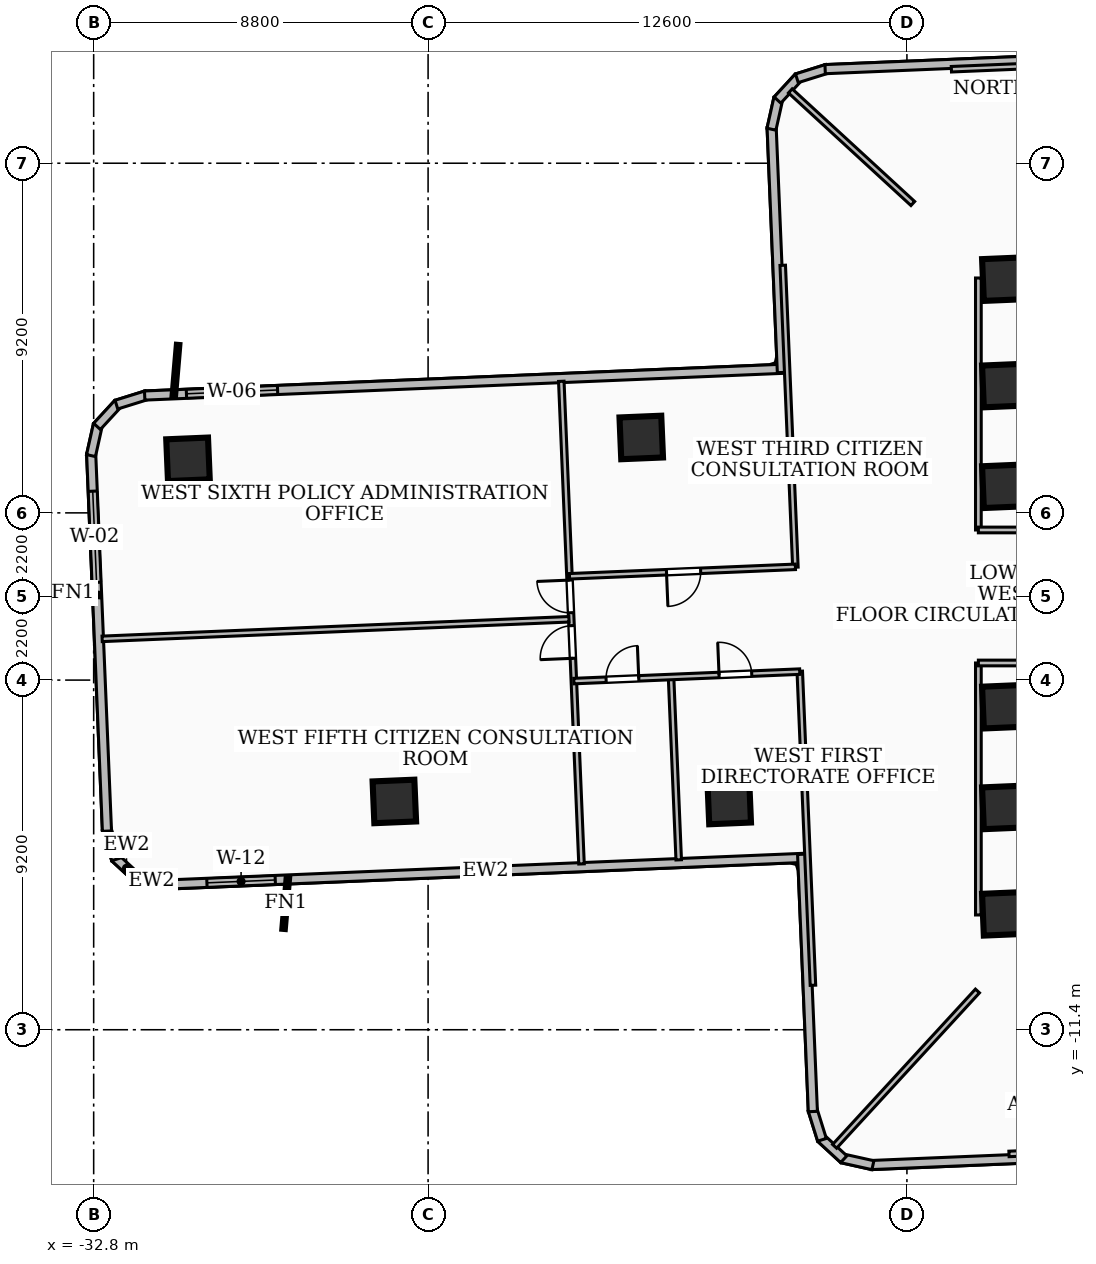
"""IFC4 building model, lengths in metres.
Left out: names, types, materials, properties, quantities, classifications, styles, units other than length and angle.
Written with IfcOpenShell. Run it as: python <this file> out.ifc"""

import sys

from ifc_helpers import new_model, si_unit, direction, frame, frame_2d, origin, origin_2d, place, context, subcontext, project, spatial, rectangle, extrude, element, fill, save


model = new_model("IFC4")
c1 = context("Model", 3, precision=1e-05, world=origin(), true_north=direction((0.0, 1.0)))
c2 = subcontext(c1, "Body", "Model", "MODEL_VIEW")
j1 = project(units=[si_unit("LENGTHUNIT", "METRE"), si_unit("PLANEANGLEUNIT", "RADIAN")], contexts=[c1])
p1 = place(None, origin())
s1 = spatial("IfcSite", under=j1, at=p1, CompositionType="ELEMENT")
p2 = place(p1, origin())
s2 = spatial("IfcBuilding", under=s1, at=p2, CompositionType="ELEMENT")
p3 = place(p2, frame((0.0, 0.0, 42.48)))
s3 = spatial("IfcBuildingStorey", under=s2, at=p3, CompositionType="ELEMENT", Elevation=42.48)
for number, where, z_axis, x_axis in (
    (1, (-8.78, 8.585, 0.0), (0.0, 0.0, 1.0), (1.0, 0.0, 0.0)),
    (2, (8.78, -8.585, 0.0), (0.0, 0.0, 1.0), (-1.0, 0.0, 0.0)),
):
    element("IfcWall", number, at=place(p3, frame(where, z_axis=z_axis, x_axis=x_axis)), inside=s3, PredefinedType="SHEAR", context=c2, shape_type="SweptSolid", body=[
        extrude(rectangle(XDim=17.56, YDim=0.55, at=frame_2d((8.78, 0.0))), origin(), (0.0, 0.0, 1.0), 3.34),
    ])
for number, where, z_axis, x_axis in (
    (3, (-8.85, -5.55, 0.0), (0.0, 0.0, 1.0), (0.999, 0.042, 0.0)),
    (4, (-8.85, -2.9, 0.0), (0.0, 0.0, 1.0), (0.999, 0.042, 0.0)),
    (5, (-8.85, 2.9, 0.0), (0.0, 0.0, 1.0), (0.999, 0.042, 0.0)),
    (6, (-8.85, 5.55, 0.0), (0.0, 0.0, 1.0), (0.999, 0.042, 0.0)),
    (7, (-8.85, 8.35, 0.0), (0.0, 0.0, 1.0), (0.999, 0.042, 0.0)),
    (8, (-8.85, -8.35, 0.0), (0.0, 0.0, 1.0), (0.999, 0.042, 0.0)),
    (9, (-18.391, 4.184, 0.0), (0.0, 0.0, 1.0), (0.999, 0.042, 0.0)),
    (10, (-16.076, -5.421, 0.0), (0.0, 0.0, 1.0), (0.999, 0.042, 0.0)),
    (11, (-30.318, 3.609, 0.0), (0.0, 0.0, 1.0), (0.999, 0.042, 0.0)),
    (12, (-24.888, -5.393, 0.0), (0.0, 0.0, 1.0), (0.999, 0.042, 0.0)),
):
    element("IfcColumn", number, at=place(p3, frame(where, z_axis=z_axis, x_axis=x_axis)), inside=s3, PredefinedType="COLUMN", context=c2, shape_type="SweptSolid", body=[
        extrude(rectangle(XDim=1.1, YDim=1.1, at=origin_2d()), origin(), (0.0, 0.0, 1.0), 3.6),
    ])
p4 = place(p3, frame((-14.058, -6.875, 0.0), z_axis=(0.0, 0.0, 1.0), x_axis=(-0.999124376175, -0.04183874918, 0.0)))
e13 = element("IfcWall", 13, at=p4, inside=s3, PredefinedType="SOLIDWALL", context=c2, shape_type="SweptSolid", body=[
    extrude(rectangle(XDim=16.876, YDim=0.24, at=frame_2d((8.438, 0.0))), origin(), (0.0, 0.0, 1.0), 3.34),
])
p5 = place(p4, frame((13.976, 0.0, 0.85)))
e14 = element("IfcOpeningElement", 14, at=p5, cuts=e13, PredefinedType="OPENING", context=c2, shape_type="SweptSolid", body=[
    extrude(rectangle(XDim=1.8, YDim=1.6, at=frame_2d((0.9, 0.8))), frame((0.0, 0.13, 0.0), z_axis=(0.0, -1.0, 0.0), x_axis=(1.0, 0.0, 0.0)), (0.0, 0.0, 1.0), 0.26),
])
p6 = place(p3, frame((-30.87, -7.585, 0.0), z_axis=(0.0, 0.0, 1.0), x_axis=(-0.976138507006, 0.217148831773, 0.0)))
e15 = element("IfcWall", 15, at=p6, inside=s3, PredefinedType="SOLIDWALL", context=c2, shape_type="SweptSolid", body=[
    extrude(rectangle(XDim=0.829, YDim=0.24, at=frame_2d((0.414, 0.0))), origin(), (0.0, 0.0, 1.0), 3.34),
])
p7 = place(p3, frame((-31.637, -7.427, 0.0), z_axis=(0.0, 0.0, 1.0), x_axis=(-0.73603262681, 0.676946063044, 0.0)))
e16 = element("IfcWall", 16, at=p7, inside=s3, PredefinedType="SOLIDWALL", context=c2, shape_type="SweptSolid", body=[
    extrude(rectangle(XDim=0.814, YDim=0.24, at=frame_2d((0.407, 0.0))), origin(), (0.0, 0.0, 1.0), 3.34),
])
p8 = place(p3, frame((-32.211, -6.917, 0.0), z_axis=(0.0, 0.0, 1.0), x_axis=(-0.297805793488, 0.954626476359, 0.0)))
e17 = element("IfcWall", 17, at=p8, inside=s3, PredefinedType="SOLIDWALL", context=c2, shape_type="SweptSolid", body=[
    extrude(rectangle(XDim=0.83, YDim=0.24, at=frame_2d((0.415, 0.0))), origin(), (0.0, 0.0, 1.0), 3.34),
])
p9 = place(p3, frame((-32.45, -6.174, 0.0), z_axis=(0.0, 0.0, 1.0), x_axis=(-0.041857368543, 0.999123596308, 0.0)))
e18 = element("IfcWall", 18, at=p9, inside=s3, PredefinedType="SOLIDWALL", context=c2, shape_type="SweptSolid", body=[
    extrude(rectangle(XDim=9.939, YDim=0.24, at=frame_2d((4.969, 0.0))), origin(), (0.0, 0.0, 1.0), 3.34),
])
p10 = place(p9, frame((6.552, 0.0, 0.85)))
e19 = element("IfcOpeningElement", 19, at=p10, cuts=e18, PredefinedType="OPENING", context=c2, shape_type="SweptSolid", body=[
    extrude(rectangle(XDim=2.4, YDim=2.1, at=frame_2d((1.2, 1.05))), frame((0.0, 0.13, 0.0), z_axis=(0.0, -1.0, 0.0), x_axis=(1.0, 0.0, 0.0)), (0.0, 0.0, 1.0), 0.26),
])
p11 = place(p3, frame((-32.87, 3.707, 0.0), z_axis=(0.0, 0.0, 1.0), x_axis=(0.21711735544, 0.976145508604, 0.0)))
e20 = element("IfcWall", 20, at=p11, inside=s3, PredefinedType="SOLIDWALL", context=c2, shape_type="SweptSolid", body=[
    extrude(rectangle(XDim=0.83, YDim=0.24, at=frame_2d((0.415, 0.0))), origin(), (0.0, 0.0, 1.0), 3.34),
])
p12 = place(p3, frame((-32.712, 4.475, 0.0), z_axis=(0.0, 0.0, 1.0), x_axis=(0.677693750404, 0.735344259965, 0.0)))
e21 = element("IfcWall", 21, at=p12, inside=s3, PredefinedType="SOLIDWALL", context=c2, shape_type="SweptSolid", body=[
    extrude(rectangle(XDim=0.813, YDim=0.24, at=frame_2d((0.406, 0.0))), origin(), (0.0, 0.0, 1.0), 3.34),
])
p13 = place(p3, frame((-32.202, 5.048, 0.0), z_axis=(0.0, 0.0, 1.0), x_axis=(0.954814146828, 0.297203541393, 0.0)))
e22 = element("IfcWall", 22, at=p13, inside=s3, PredefinedType="SOLIDWALL", context=c2, shape_type="SweptSolid", body=[
    extrude(rectangle(XDim=0.831, YDim=0.24, at=frame_2d((0.415, 0.0))), origin(), (0.0, 0.0, 1.0), 3.34),
])
p14 = place(p3, frame((-31.458, 5.287, 0.0), z_axis=(0.0, 0.0, 1.0), x_axis=(0.999122484842, 0.041883890494, 0.0)))
e23 = element("IfcWall", 23, at=p14, inside=s3, PredefinedType="SOLIDWALL", context=c2, shape_type="SweptSolid", body=[
    extrude(rectangle(XDim=16.875, YDim=0.24, at=frame_2d((8.438, 0.0))), origin(), (0.0, 0.0, 1.0), 3.34),
])
p15 = place(p14, frame((1.1, 0.0, 0.85)))
e24 = element("IfcOpeningElement", 24, at=p15, cuts=e23, PredefinedType="OPENING", context=c2, shape_type="SweptSolid", body=[
    extrude(rectangle(XDim=2.4, YDim=1.85, at=frame_2d((1.2, 0.925))), frame((0.0, 0.13, 0.0), z_axis=(0.0, -1.0, 0.0), x_axis=(1.0, 0.0, 0.0)), (0.0, 0.0, 1.0), 0.26),
])
p16 = place(p3, frame((-14.69, 5.894, 0.0), z_axis=(0.0, 0.0, 1.0), x_axis=(-0.041827173477, 0.999124860845, 0.0)))
e25 = element("IfcWall", 25, at=p16, inside=s3, PredefinedType="SOLIDWALL", context=c2, shape_type="SweptSolid", body=[
    extrude(rectangle(XDim=6.456, YDim=0.24, at=frame_2d((3.228, 0.0))), origin(), (0.0, 0.0, 1.0), 3.34),
])
p17 = place(p3, frame((-14.964, 12.295, 0.0), z_axis=(0.0, 0.0, 1.0), x_axis=(0.21736704137, 0.976089939158, 0.0)))
e26 = element("IfcWall", 26, at=p17, inside=s3, PredefinedType="SOLIDWALL", context=c2, shape_type="SweptSolid", body=[
    extrude(rectangle(XDim=0.829, YDim=0.24, at=frame_2d((0.415, 0.0))), origin(), (0.0, 0.0, 1.0), 3.34),
])
p18 = place(p3, frame((-14.806, 13.062, 0.0), z_axis=(0.0, 0.0, 1.0), x_axis=(0.677693750404, 0.735344259965, 0.0)))
e27 = element("IfcWall", 27, at=p18, inside=s3, PredefinedType="SOLIDWALL", context=c2, shape_type="SweptSolid", body=[
    extrude(rectangle(XDim=0.813, YDim=0.24, at=frame_2d((0.406, 0.0))), origin(), (0.0, 0.0, 1.0), 3.34),
])
p19 = place(p3, frame((-14.296, 13.635, 0.0), z_axis=(0.0, 0.0, 1.0), x_axis=(0.954396284631, 0.298542680168, 0.0)))
e28 = element("IfcWall", 28, at=p19, inside=s3, PredefinedType="SOLIDWALL", context=c2, shape_type="SweptSolid", body=[
    extrude(rectangle(XDim=0.831, YDim=0.24, at=frame_2d((0.416, 0.0))), origin(), (0.0, 0.0, 1.0), 3.34),
])
p20 = place(p3, frame((-13.552, 13.875, 0.0), z_axis=(0.0, 0.0, 1.0), x_axis=(0.999127443157, 0.041765444226, 0.0)))
e29 = element("IfcWall", 29, at=p20, inside=s3, PredefinedType="SOLIDWALL", context=c2, shape_type="SweptSolid", body=[
    extrude(rectangle(XDim=6.775, YDim=0.24, at=frame_2d((3.387, 0.0))), origin(), (0.0, 0.0, 1.0), 3.34),
])
p21 = place(p3, frame((-5.894, -14.69, 0.0), z_axis=(0.0, 0.0, 1.0), x_axis=(-0.999124860845, -0.041827173477, 0.0)))
e30 = element("IfcWall", 30, at=p21, inside=s3, PredefinedType="SOLIDWALL", context=c2, shape_type="SweptSolid", body=[
    extrude(rectangle(XDim=6.456, YDim=0.24, at=frame_2d((3.228, 0.0))), origin(), (0.0, 0.0, 1.0), 2.421),
])
p22 = place(p3, frame((-12.295, -14.964, 0.0), z_axis=(0.0, 0.0, 1.0), x_axis=(-0.976089939158, 0.21736704137, 0.0)))
e31 = element("IfcWall", 31, at=p22, inside=s3, PredefinedType="SOLIDWALL", context=c2, shape_type="SweptSolid", body=[
    extrude(rectangle(XDim=0.829, YDim=0.24, at=frame_2d((0.415, 0.0))), origin(), (0.0, 0.0, 1.0), 3.34),
])
p23 = place(p3, frame((-13.062, -14.806, 0.0), z_axis=(0.0, 0.0, 1.0), x_axis=(-0.735344259965, 0.677693750404, 0.0)))
e32 = element("IfcWall", 32, at=p23, inside=s3, PredefinedType="SOLIDWALL", context=c2, shape_type="SweptSolid", body=[
    extrude(rectangle(XDim=0.813, YDim=0.24, at=frame_2d((0.406, 0.0))), origin(), (0.0, 0.0, 1.0), 3.34),
])
p24 = place(p3, frame((-13.635, -14.296, 0.0), z_axis=(0.0, 0.0, 1.0), x_axis=(-0.298542680168, 0.954396284631, 0.0)))
e33 = element("IfcWall", 33, at=p24, inside=s3, PredefinedType="SOLIDWALL", context=c2, shape_type="SweptSolid", body=[
    extrude(rectangle(XDim=0.831, YDim=0.24, at=frame_2d((0.416, 0.0))), origin(), (0.0, 0.0, 1.0), 3.34),
])
p25 = place(p3, frame((-13.875, -13.552, 0.0), z_axis=(0.0, 0.0, 1.0), x_axis=(-0.041765444226, 0.999127443157, 0.0)))
e34 = element("IfcWall", 34, at=p25, inside=s3, PredefinedType="SOLIDWALL", context=c2, shape_type="SweptSolid", body=[
    extrude(rectangle(XDim=6.775, YDim=0.24, at=frame_2d((3.387, 0.0))), origin(), (0.0, 0.0, 1.0), 3.34),
])
p26 = place(p3, frame((-9.52, 1.75, 0.0), z_axis=(0.0, 0.0, 1.0), x_axis=(0.0, 1.0, 0.0)))
e35 = element("IfcWall", 35, at=p26, inside=s3, PredefinedType="PARTITIONING", context=c2, shape_type="SweptSolid", body=[
    extrude(rectangle(XDim=6.63, YDim=0.15, at=frame_2d((3.315, 0.0))), origin(), (0.0, 0.0, 1.0), 2.421),
])
p27 = place(p3, frame((-7.85, 1.75, 0.0), z_axis=(0.0, 0.0, 1.0), x_axis=(-1.0, 0.0, 0.0)))
e36 = element("IfcWall", 36, at=p27, inside=s3, PredefinedType="PARTITIONING", context=c2, shape_type="SweptSolid", body=[
    extrude(rectangle(XDim=1.67, YDim=0.15, at=frame_2d((0.835, 0.0))), origin(), (0.0, 0.0, 1.0), 2.405),
])
p28 = place(p3, frame((-9.52, -8.38, 0.0), z_axis=(0.0, 0.0, 1.0), x_axis=(0.0, 1.0, 0.0)))
e37 = element("IfcWall", 37, at=p28, inside=s3, PredefinedType="PARTITIONING", context=c2, shape_type="SweptSolid", body=[
    extrude(rectangle(XDim=6.63, YDim=0.15, at=frame_2d((3.315, 0.0))), origin(), (0.0, 0.0, 1.0), 2.421),
])
p29 = place(p3, frame((-7.85, -1.75, 0.0), z_axis=(0.0, 0.0, 1.0), x_axis=(-1.0, 0.0, 0.0)))
e38 = element("IfcWall", 38, at=p29, inside=s3, PredefinedType="PARTITIONING", context=c2, shape_type="SweptSolid", body=[
    extrude(rectangle(XDim=1.67, YDim=0.15, at=frame_2d((0.835, 0.0))), origin(), (0.0, 0.0, 1.0), 2.405),
])
p30 = place(p3, frame((-11.245, 10.34, 0.0), z_axis=(0.0, 0.0, 1.0), x_axis=(-0.736178820698, 0.676787074312, 0.0)))
e39 = element("IfcWall", 39, at=p30, inside=s3, PredefinedType="PARTITIONING", context=c2, shape_type="SweptSolid", body=[
    extrude(rectangle(XDim=4.378, YDim=0.145, at=frame_2d((2.189, 0.0))), origin(), (0.0, 0.0, 1.0), 3.34),
])
p31 = place(p3, frame((-9.544, -10.38, 0.0), z_axis=(0.0, 0.0, 1.0), x_axis=(-0.676856513188, -0.736114977809, 0.0)))
e40 = element("IfcWall", 40, at=p31, inside=s3, PredefinedType="PARTITIONING", context=c2, shape_type="SweptSolid", body=[
    extrude(rectangle(XDim=5.554, YDim=0.145, at=frame_2d((2.777, 0.0))), origin(), (0.0, 0.0, 1.0), 3.34),
])
for number, where, z_axis, x_axis in (
    (41, (-1.967, 14.22, 0.0), (0.0, 0.0, 1.0), (-0.999, -0.042, 0.0)),
    (42, (-14.22, -1.967, 0.0), (0.0, 0.0, 1.0), (0.042, -0.999, 0.0)),
):
    element("IfcWall", number, at=place(p3, frame(where, z_axis=z_axis, x_axis=x_axis)), inside=s3, PredefinedType="PARTITIONING", context=c2, shape_type="SweptSolid", body=[
        extrude(rectangle(XDim=8.27, YDim=0.145, at=frame_2d((4.135, 0.0))), origin(), (0.0, 0.0, 1.0), 2.421),
    ])
p32 = place(p3, frame((-14.668, 8.714, 0.0), z_axis=(0.0, 0.0, 1.0), x_axis=(0.041882146625, -0.999122557945, 0.0)))
e43 = element("IfcWall", 43, at=p32, inside=s3, PredefinedType="PARTITIONING", context=c2, shape_type="SweptSolid", body=[
    extrude(rectangle(XDim=7.951, YDim=0.145, at=frame_2d((3.976, 0.0))), origin(), (0.0, 0.0, 1.0), 2.421),
])
p33 = place(p3, frame((-17.606, -2.139, 0.0), z_axis=(0.0, 0.0, 1.0), x_axis=(0.041901609945, -0.999121741873, 0.0)))
e44 = element("IfcWall", 44, at=p33, inside=s3, PredefinedType="PARTITIONING", context=c2, shape_type="SweptSolid", body=[
    extrude(rectangle(XDim=4.795, YDim=0.145, at=frame_2d((2.397, 0.0))), origin(), (0.0, 0.0, 1.0), 2.421),
])
p34 = place(p3, frame((-20.164, -2.226, 0.0), z_axis=(0.0, 0.0, 1.0), x_axis=(0.999123588206, 0.041857561916, 0.0)))
e45 = element("IfcWall", 45, at=p34, inside=s3, PredefinedType="PARTITIONING", context=c2, shape_type="SweptSolid", body=[
    extrude(rectangle(XDim=5.949, YDim=0.145, at=frame_2d((2.975, 0.0))), origin(), (0.0, 0.0, 1.0), 3.34),
])
p35 = place(p34, frame((3.824, 0.0, 0.0)))
e46 = element("IfcOpeningElement", 46, at=p35, cuts=e45, PredefinedType="OPENING", context=c2, shape_type="SweptSolid", body=[
    extrude(rectangle(XDim=0.86, YDim=2.04, at=frame_2d((0.43, 1.02))), frame((0.0, 0.083, 0.0), z_axis=(0.0, -1.0, 0.0), x_axis=(1.0, 0.0, 0.0)), (0.0, 0.0, 1.0), 0.165),
])
p36 = place(p34, frame((0.849, 0.0, 0.0)))
e47 = element("IfcOpeningElement", 47, at=p36, cuts=e45, PredefinedType="OPENING", context=c2, shape_type="SweptSolid", body=[
    extrude(rectangle(XDim=0.86, YDim=2.04, at=frame_2d((0.43, 1.02))), frame((0.0, 0.083, 0.0), z_axis=(0.0, -1.0, 0.0), x_axis=(1.0, 0.0, 0.0)), (0.0, 0.0, 1.0), 0.165),
])
p37 = place(p3, frame((-14.335, 0.78, 0.0), z_axis=(0.0, 0.0, 1.0), x_axis=(-0.999123875731, -0.041850698257, 0.0)))
e48 = element("IfcWall", 48, at=p37, inside=s3, PredefinedType="PARTITIONING", context=c2, shape_type="SweptSolid", body=[
    extrude(rectangle(XDim=5.95, YDim=0.145, at=frame_2d((2.975, 0.0))), origin(), (0.0, 0.0, 1.0), 3.34),
])
p38 = place(p37, frame((2.495, 0.0, 0.0)))
e49 = element("IfcOpeningElement", 49, at=p38, cuts=e48, PredefinedType="OPENING", context=c2, shape_type="SweptSolid", body=[
    extrude(rectangle(XDim=0.9, YDim=2.06, at=frame_2d((0.45, 1.03))), frame((0.0, 0.083, 0.0), z_axis=(0.0, -1.0, 0.0), x_axis=(1.0, 0.0, 0.0)), (0.0, 0.0, 1.0), 0.165),
])
p39 = place(p3, frame((-20.293, -0.6, 0.0), z_axis=(0.0, 0.0, 1.0), x_axis=(-0.9991226833, -0.041879156098, 0.0)))
e50 = element("IfcWall", 50, at=p39, inside=s3, PredefinedType="PARTITIONING", context=c2, shape_type="SweptSolid", body=[
    extrude(rectangle(XDim=12.295, YDim=0.145, at=frame_2d((6.147, 0.0))), origin(), (0.0, 0.0, 1.0), 2.832),
])
p40 = place(p3, frame((-19.963, -7.037, 0.0), z_axis=(0.0, 0.0, 1.0), x_axis=(-0.041873423051, 0.999122923589, 0.0)))
e51 = element("IfcWall", 51, at=p40, inside=s3, PredefinedType="PARTITIONING", context=c2, shape_type="SweptSolid", body=[
    extrude(rectangle(XDim=12.71, YDim=0.145, at=frame_2d((6.355, 0.0))), origin(), (0.0, 0.0, 1.0), 2.421),
])
p41 = place(p40, frame((6.615, 0.0, 0.0)))
e52 = element("IfcOpeningElement", 52, at=p41, cuts=e51, PredefinedType="OPENING", context=c2, shape_type="SweptSolid", body=[
    extrude(rectangle(XDim=0.86, YDim=2.04, at=frame_2d((0.43, 1.02))), frame((0.0, 0.083, 0.0), z_axis=(0.0, -1.0, 0.0), x_axis=(1.0, 0.0, 0.0)), (0.0, 0.0, 1.0), 0.165),
])
p42 = place(p40, frame((5.415, 0.0, 0.0)))
e53 = element("IfcOpeningElement", 53, at=p42, cuts=e51, PredefinedType="OPENING", context=c2, shape_type="SweptSolid", body=[
    extrude(rectangle(XDim=0.86, YDim=2.04, at=frame_2d((0.43, 1.02))), frame((0.0, 0.083, 0.0), z_axis=(0.0, -1.0, 0.0), x_axis=(1.0, 0.0, 0.0)), (0.0, 0.0, 1.0), 0.165),
])
p43 = place(p3, frame((-8.714, -14.668, 0.0), z_axis=(0.0, 0.0, 1.0), x_axis=(0.999122557945, 0.041882146625, 0.0)))
e54 = element("IfcWall", 54, at=p43, inside=s3, PredefinedType="PARTITIONING", context=c2, shape_type="SweptSolid", body=[
    extrude(rectangle(XDim=7.951, YDim=0.145, at=frame_2d((3.976, 0.0))), origin(), (0.0, 0.0, 1.0), 2.421),
])
p44 = place(p5, origin())
e55 = element("IfcWindow", 55, at=p44, inside=s3, PartitioningType="SINGLE_PANEL", PredefinedType="WINDOW", context=c2, shape_type="SweptSolid", body=[
    extrude(rectangle(XDim=1.8, YDim=1.6, at=frame_2d((0.9, 0.8))), frame((0.0, 0.03, 0.0), z_axis=(0.0, -1.0, 0.0), x_axis=(1.0, 0.0, 0.0)), (0.0, 0.0, 1.0), 0.06),
])
fill(e14, e55)
p45 = place(p10, origin())
e56 = element("IfcWindow", 56, at=p45, inside=s3, PartitioningType="SINGLE_PANEL", PredefinedType="WINDOW", context=c2, shape_type="SweptSolid", body=[
    extrude(rectangle(XDim=2.4, YDim=2.1, at=frame_2d((1.2, 1.05))), frame((0.0, 0.03, 0.0), z_axis=(0.0, -1.0, 0.0), x_axis=(1.0, 0.0, 0.0)), (0.0, 0.0, 1.0), 0.06),
])
fill(e19, e56)
p46 = place(p15, origin())
e57 = element("IfcWindow", 57, at=p46, inside=s3, PartitioningType="SINGLE_PANEL", PredefinedType="WINDOW", context=c2, shape_type="SweptSolid", body=[
    extrude(rectangle(XDim=2.4, YDim=1.85, at=frame_2d((1.2, 0.925))), frame((0.0, 0.03, 0.0), z_axis=(0.0, -1.0, 0.0), x_axis=(1.0, 0.0, 0.0)), (0.0, 0.0, 1.0), 0.06),
])
fill(e24, e57)
p47 = place(p35, origin())
e58 = element("IfcDoor", 58, at=p47, inside=s3, OperationType="SINGLE_SWING_LEFT", PredefinedType="DOOR", context=c2, shape_type="SweptSolid", body=[
    extrude(rectangle(XDim=0.86, YDim=2.04, at=frame_2d((0.43, 1.02))), frame((0.0, 0.025, 0.0), z_axis=(0.0, -1.0, 0.0), x_axis=(1.0, 0.0, 0.0)), (0.0, 0.0, 1.0), 0.05),
])
fill(e46, e58)
p48 = place(p36, origin())
e59 = element("IfcDoor", 59, at=p48, inside=s3, OperationType="SINGLE_SWING_RIGHT", PredefinedType="DOOR", context=c2, shape_type="SweptSolid", body=[
    extrude(rectangle(XDim=0.86, YDim=2.04, at=frame_2d((0.43, 1.02))), frame((0.0, 0.025, 0.0), z_axis=(0.0, -1.0, 0.0), x_axis=(1.0, 0.0, 0.0)), (0.0, 0.0, 1.0), 0.05),
])
fill(e47, e59)
p49 = place(p38, origin())
e60 = element("IfcDoor", 60, at=p49, inside=s3, OperationType="SINGLE_SWING_RIGHT", PredefinedType="DOOR", context=c2, shape_type="SweptSolid", body=[
    extrude(rectangle(XDim=0.9, YDim=2.06, at=frame_2d((0.45, 1.03))), frame((0.0, 0.025, 0.0), z_axis=(0.0, -1.0, 0.0), x_axis=(1.0, 0.0, 0.0)), (0.0, 0.0, 1.0), 0.05),
])
fill(e49, e60)
p50 = place(p41, origin())
e61 = element("IfcDoor", 61, at=p50, inside=s3, OperationType="SINGLE_SWING_RIGHT", PredefinedType="DOOR", context=c2, shape_type="SweptSolid", body=[
    extrude(rectangle(XDim=0.86, YDim=2.04, at=frame_2d((0.43, 1.02))), frame((0.0, 0.025, 0.0), z_axis=(0.0, -1.0, 0.0), x_axis=(1.0, 0.0, 0.0)), (0.0, 0.0, 1.0), 0.05),
])
fill(e52, e61)
p51 = place(p42, origin())
e62 = element("IfcDoor", 62, at=p51, inside=s3, OperationType="SINGLE_SWING_LEFT", PredefinedType="DOOR", context=c2, shape_type="SweptSolid", body=[
    extrude(rectangle(XDim=0.86, YDim=2.04, at=frame_2d((0.43, 1.02))), frame((0.0, 0.025, 0.0), z_axis=(0.0, -1.0, 0.0), x_axis=(1.0, 0.0, 0.0)), (0.0, 0.0, 1.0), 0.05),
])
fill(e53, e62)
save(model, sys.argv[1])
